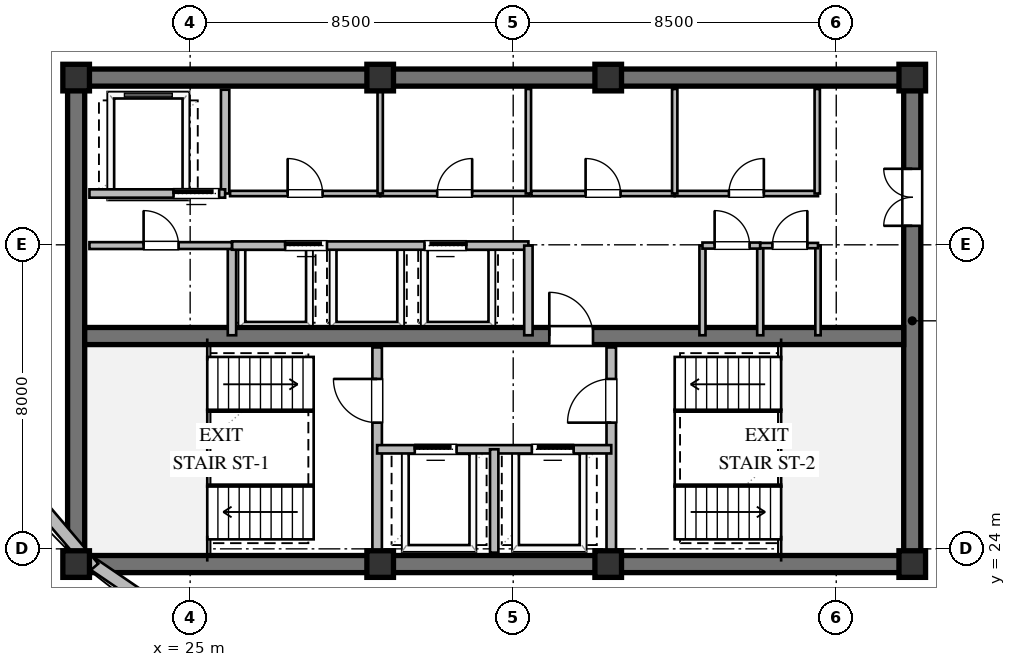
"""IFC4 building model, lengths in metres.
Left out: names, types, materials, properties, quantities, classifications, styles, units other than length and angle.
Written with IfcOpenShell. Run it as: python <this file> out.ifc"""

import sys

from ifc_helpers import new_model, si_unit, direction, frame, frame_2d, origin, origin_2d, place, context, subcontext, project, spatial, rectangle, extrude, element, fill, save


model = new_model("IFC4")
c1 = context("Model", 3, precision=1e-05, world=origin(), true_north=direction((0.0, 1.0)))
c2 = subcontext(c1, "Body", "Model", "MODEL_VIEW")
j1 = project(units=[si_unit("LENGTHUNIT", "METRE"), si_unit("PLANEANGLEUNIT", "RADIAN")], contexts=[c1])
p1 = place(None, origin())
s1 = spatial("IfcSite", under=j1, at=p1, CompositionType="ELEMENT")
p2 = place(p1, origin())
s2 = spatial("IfcBuilding", under=s1, at=p2, CompositionType="ELEMENT")
p3 = place(p2, frame((0.0, 0.0, 277.6)))
s3 = spatial("IfcBuildingStorey", under=s2, at=p3, CompositionType="ELEMENT", Elevation=277.6)
for number, where, z_axis, x_axis in (
    (1, (21.775, 23.6, 0.0), (0.0, 0.0, 1.0), (1.0, 0.0, 0.0)),
    (2, (21.775, 36.4, 0.0), (0.0, 0.0, 1.0), (1.0, 0.0, 0.0)),
):
    element("IfcWall", number, at=place(p3, frame(where, z_axis=z_axis, x_axis=x_axis)), inside=s3, PredefinedType="SHEAR", context=c2, shape_type="SweptSolid", body=[
        extrude(rectangle(XDim=22.45, YDim=0.45, at=frame_2d((11.225, 0.0))), origin(), (0.0, 0.0, 1.0), 3.48),
    ])
p4 = place(p3, frame((22.0, 23.825, 0.0), z_axis=(0.0, 0.0, 1.0), x_axis=(0.0, 1.0, 0.0)))
e3 = element("IfcWall", 3, at=p4, inside=s3, PredefinedType="SHEAR", context=c2, shape_type="SweptSolid", body=[
    extrude(rectangle(XDim=12.35, YDim=0.45, at=frame_2d((6.175, 0.0))), origin(), (0.0, 0.0, 1.0), 3.48),
])
p5 = place(p3, frame((44.0, 23.825, 0.0), z_axis=(0.0, 0.0, 1.0), x_axis=(0.0, 1.0, 0.0)))
e4 = element("IfcWall", 4, at=p5, inside=s3, PredefinedType="SHEAR", context=c2, shape_type="SweptSolid", body=[
    extrude(rectangle(XDim=12.35, YDim=0.45, at=frame_2d((6.175, 0.0))), origin(), (0.0, 0.0, 1.0), 3.48),
])
p6 = place(p5, frame((8.675, 0.0, 0.0)))
e5 = element("IfcOpeningElement", 5, at=p6, cuts=e4, PredefinedType="OPENING", context=c2, shape_type="SweptSolid", body=[
    extrude(rectangle(XDim=1.5, YDim=2.15, at=frame_2d((0.75, 1.075))), frame((0.0, 0.235, 0.0), z_axis=(0.0, -1.0, 0.0), x_axis=(1.0, 0.0, 0.0)), (0.0, 0.0, 1.0), 0.47),
])
p7 = place(p3, frame((22.225, 29.6, 0.0), z_axis=(0.0, 0.0, 1.0), x_axis=(1.0, 0.0, 0.0)))
e6 = element("IfcWall", 6, at=p7, inside=s3, PredefinedType="SHEAR", context=c2, shape_type="SweptSolid", body=[
    extrude(rectangle(XDim=21.55, YDim=0.45, at=frame_2d((10.775, 0.0))), origin(), (0.0, 0.0, 1.0), 3.48),
])
p8 = place(p7, frame((12.225, 0.0, 0.0)))
e7 = element("IfcOpeningElement", 7, at=p8, cuts=e6, PredefinedType="OPENING", context=c2, shape_type="SweptSolid", body=[
    extrude(rectangle(XDim=1.15, YDim=2.1, at=frame_2d((0.575, 1.05))), frame((0.0, 0.235, 0.0), z_axis=(0.0, -1.0, 0.0), x_axis=(1.0, 0.0, 0.0)), (0.0, 0.0, 1.0), 0.47),
])
for number, where, z_axis, x_axis in (
    (8, (22.0, 23.6, 0.0), (0.0, 0.0, 1.0), (1.0, 0.0, 0.0)),
    (9, (30.0, 23.6, 0.0), (0.0, 0.0, 1.0), (1.0, 0.0, 0.0)),
    (10, (36.0, 23.6, 0.0), (0.0, 0.0, 1.0), (1.0, 0.0, 0.0)),
    (11, (44.0, 23.6, 0.0), (0.0, 0.0, 1.0), (1.0, 0.0, 0.0)),
    (12, (44.0, 36.4, 0.0), (0.0, 0.0, 1.0), (1.0, 0.0, 0.0)),
    (13, (36.0, 36.4, 0.0), (0.0, 0.0, 1.0), (1.0, 0.0, 0.0)),
    (14, (30.0, 36.4, 0.0), (0.0, 0.0, 1.0), (1.0, 0.0, 0.0)),
    (15, (22.0, 36.4, 0.0), (0.0, 0.0, 1.0), (1.0, 0.0, 0.0)),
):
    element("IfcColumn", number, at=place(p3, frame(where, z_axis=z_axis, x_axis=x_axis)), inside=s3, PredefinedType="COLUMN", context=c2, shape_type="SweptSolid", body=[
        extrude(rectangle(XDim=0.7, YDim=0.7, at=origin_2d()), origin(), (0.0, 0.0, 1.0), 3.8),
    ])
p9 = place(p3, frame((27.093, 20.428, 0.0), z_axis=(0.0, 0.0, 1.0), x_axis=(-0.826047009588, 0.563601222454, 0.0)))
e16 = element("IfcWall", 16, at=p9, inside=s3, PredefinedType="STANDARD", context=c2, shape_type="SweptSolid", body=[
    extrude(rectangle(XDim=6.074, YDim=0.32, at=frame_2d((3.037, 0.0))), origin(), (0.0, 0.0, 1.0), 2.35),
])
p10 = place(p3, frame((22.46, 23.506, 0.0), z_axis=(0.0, 0.0, 1.0), x_axis=(-0.648393724369, 0.761305180725, 0.0)))
e17 = element("IfcWall", 17, at=p10, inside=s3, PredefinedType="STANDARD", context=c2, shape_type="SweptSolid", body=[
    extrude(rectangle(XDim=5.836, YDim=0.32, at=frame_2d((2.918, 0.0))), origin(), (0.0, 0.0, 1.0), 2.62),
])
p11 = place(p3, frame((29.92, 23.9, 0.0), z_axis=(0.0, 0.0, 1.0), x_axis=(0.0, 1.0, 0.0)))
e18 = element("IfcWall", 18, at=p11, inside=s3, PredefinedType="SOLIDWALL", context=c2, shape_type="SweptSolid", body=[
    extrude(rectangle(XDim=5.4, YDim=0.25, at=frame_2d((2.7, 0.0))), origin(), (0.0, 0.0, 1.0), 3.01),
])
p12 = place(p11, frame((3.421, 0.0, 0.0)))
e19 = element("IfcOpeningElement", 19, at=p12, cuts=e18, PredefinedType="OPENING", context=c2, shape_type="SweptSolid", body=[
    extrude(rectangle(XDim=1.15, YDim=2.1, at=frame_2d((0.575, 1.05))), frame((0.0, 0.135, 0.0), z_axis=(0.0, -1.0, 0.0), x_axis=(1.0, 0.0, 0.0)), (0.0, 0.0, 1.0), 0.27),
])
p13 = place(p3, frame((36.08, 23.9, 0.0), z_axis=(0.0, 0.0, 1.0), x_axis=(0.0, 1.0, 0.0)))
e20 = element("IfcWall", 20, at=p13, inside=s3, PredefinedType="SOLIDWALL", context=c2, shape_type="SweptSolid", body=[
    extrude(rectangle(XDim=5.4, YDim=0.25, at=frame_2d((2.7, 0.0))), origin(), (0.0, 0.0, 1.0), 3.48),
])
p14 = place(p13, frame((3.421, 0.0, 0.0)))
e21 = element("IfcOpeningElement", 21, at=p14, cuts=e20, PredefinedType="OPENING", context=c2, shape_type="SweptSolid", body=[
    extrude(rectangle(XDim=1.15, YDim=2.1, at=frame_2d((0.575, 1.05))), frame((0.0, 0.135, 0.0), z_axis=(0.0, -1.0, 0.0), x_axis=(1.0, 0.0, 0.0)), (0.0, 0.0, 1.0), 0.27),
])
p15 = place(p3, frame((29.92, 26.62, 0.0), z_axis=(0.0, 0.0, 1.0), x_axis=(1.0, 0.0, 0.0)))
e22 = element("IfcWall", 22, at=p15, inside=s3, PredefinedType="SOLIDWALL", context=c2, shape_type="SweptSolid", body=[
    extrude(rectangle(XDim=6.16, YDim=0.22, at=frame_2d((3.08, 0.0))), origin(), (0.0, 0.0, 1.0), 3.48),
])
p16 = place(p15, frame((0.99, 0.0, 0.0)))
e23 = element("IfcOpeningElement", 23, at=p16, cuts=e22, PredefinedType="OPENING", context=c2, shape_type="SweptSolid", body=[
    extrude(rectangle(XDim=1.1, YDim=2.1, at=frame_2d((0.55, 1.05))), frame((0.0, 0.12, 0.0), z_axis=(0.0, -1.0, 0.0), x_axis=(1.0, 0.0, 0.0)), (0.0, 0.0, 1.0), 0.24),
])
p17 = place(p15, frame((4.07, 0.0, 0.0)))
e24 = element("IfcOpeningElement", 24, at=p17, cuts=e22, PredefinedType="OPENING", context=c2, shape_type="SweptSolid", body=[
    extrude(rectangle(XDim=1.1, YDim=2.1, at=frame_2d((0.55, 1.05))), frame((0.0, 0.12, 0.0), z_axis=(0.0, -1.0, 0.0), x_axis=(1.0, 0.0, 0.0)), (0.0, 0.0, 1.0), 0.24),
])
p18 = place(p3, frame((33.0, 23.9, 0.0), z_axis=(0.0, 0.0, 1.0), x_axis=(0.0, 1.0, 0.0)))
e25 = element("IfcWall", 25, at=p18, inside=s3, PredefinedType="SOLIDWALL", context=c2, shape_type="SweptSolid", body=[
    extrude(rectangle(XDim=2.72, YDim=0.22, at=frame_2d((1.36, 0.0))), origin(), (0.0, 0.0, 1.0), 3.48),
])
p19 = place(p3, frame((25.92, 33.35, 0.0), z_axis=(0.0, 0.0, 1.0), x_axis=(0.0, 1.0, 0.0)))
e26 = element("IfcWall", 26, at=p19, inside=s3, PredefinedType="SOLIDWALL", context=c2, shape_type="SweptSolid", body=[
    extrude(rectangle(XDim=2.73, YDim=0.22, at=frame_2d((1.365, 0.0))), origin(), (0.0, 0.0, 1.0), 3.48),
])
p20 = place(p3, frame((22.35, 33.35, 0.0), z_axis=(0.0, 0.0, 1.0), x_axis=(1.0, 0.0, 0.0)))
e27 = element("IfcWall", 27, at=p20, inside=s3, PredefinedType="SOLIDWALL", context=c2, shape_type="SweptSolid", body=[
    extrude(rectangle(XDim=3.57, YDim=0.22, at=frame_2d((1.785, 0.0))), origin(), (0.0, 0.0, 1.0), 3.48),
])
p21 = place(p20, frame((2.213, 0.0, 0.0)))
e28 = element("IfcOpeningElement", 28, at=p21, cuts=e27, PredefinedType="OPENING", context=c2, shape_type="SweptSolid", body=[
    extrude(rectangle(XDim=1.2, YDim=2.1, at=frame_2d((0.6, 1.05))), frame((0.0, 0.12, 0.0), z_axis=(0.0, -1.0, 0.0), x_axis=(1.0, 0.0, 0.0)), (0.0, 0.0, 1.0), 0.24),
])
p22 = place(p3, frame((26.1, 29.62, 0.0), z_axis=(0.0, 0.0, 1.0), x_axis=(0.0, 1.0, 0.0)))
e29 = element("IfcWall", 29, at=p22, inside=s3, PredefinedType="SOLIDWALL", context=c2, shape_type="SweptSolid", body=[
    extrude(rectangle(XDim=2.36, YDim=0.22, at=frame_2d((1.18, 0.0))), origin(), (0.0, 0.0, 1.0), 3.48),
])
p23 = place(p3, frame((26.1, 31.98, 0.0), z_axis=(0.0, 0.0, 1.0), x_axis=(1.0, 0.0, 0.0)))
e30 = element("IfcWall", 30, at=p23, inside=s3, PredefinedType="SOLIDWALL", context=c2, shape_type="SweptSolid", body=[
    extrude(rectangle(XDim=7.8, YDim=0.22, at=frame_2d((3.9, 0.0))), origin(), (0.0, 0.0, 1.0), 3.48),
])
p24 = place(p23, frame((1.4, 0.0, 0.0)))
e31 = element("IfcOpeningElement", 31, at=p24, cuts=e30, PredefinedType="OPENING", context=c2, shape_type="SweptSolid", body=[
    extrude(rectangle(XDim=1.1, YDim=2.1, at=frame_2d((0.55, 1.05))), frame((0.0, 0.12, 0.0), z_axis=(0.0, -1.0, 0.0), x_axis=(1.0, 0.0, 0.0)), (0.0, 0.0, 1.0), 0.24),
])
p25 = place(p23, frame((5.066, 0.0, 0.0)))
e32 = element("IfcOpeningElement", 32, at=p25, cuts=e30, PredefinedType="OPENING", context=c2, shape_type="SweptSolid", body=[
    extrude(rectangle(XDim=1.1, YDim=2.1, at=frame_2d((0.55, 1.05))), frame((0.0, 0.12, 0.0), z_axis=(0.0, -1.0, 0.0), x_axis=(1.0, 0.0, 0.0)), (0.0, 0.0, 1.0), 0.24),
])
p26 = place(p3, frame((33.9, 29.62, 0.0), z_axis=(0.0, 0.0, 1.0), x_axis=(0.0, 1.0, 0.0)))
e33 = element("IfcWall", 33, at=p26, inside=s3, PredefinedType="SOLIDWALL", context=c2, shape_type="SweptSolid", body=[
    extrude(rectangle(XDim=2.36, YDim=0.22, at=frame_2d((1.18, 0.0))), origin(), (0.0, 0.0, 1.0), 3.48),
])
p27 = place(p3, frame((26.05, 33.35, 0.0), z_axis=(0.0, 0.0, 1.0), x_axis=(1.0, 0.0, 0.0)))
e34 = element("IfcWall", 34, at=p27, inside=s3, PredefinedType="PARTITIONING", context=c2, shape_type="SweptSolid", body=[
    extrude(rectangle(XDim=3.95, YDim=0.14, at=frame_2d((1.975, 0.0))), origin(), (0.0, 0.0, 1.0), 3.48),
])
p28 = place(p27, frame((1.515, 0.0, 0.0)))
e35 = element("IfcOpeningElement", 35, at=p28, cuts=e34, PredefinedType="OPENING", context=c2, shape_type="SweptSolid", body=[
    extrude(rectangle(XDim=0.92, YDim=2.1, at=frame_2d((0.46, 1.05))), frame((0.0, 0.08, 0.0), z_axis=(0.0, -1.0, 0.0), x_axis=(1.0, 0.0, 0.0)), (0.0, 0.0, 1.0), 0.16),
])
p29 = place(p3, frame((30.0, 33.35, 0.0), z_axis=(0.0, 0.0, 1.0), x_axis=(1.0, 0.0, 0.0)))
e36 = element("IfcWall", 36, at=p29, inside=s3, PredefinedType="PARTITIONING", context=c2, shape_type="SweptSolid", body=[
    extrude(rectangle(XDim=3.92, YDim=0.14, at=frame_2d((1.96, 0.0))), origin(), (0.0, 0.0, 1.0), 3.48),
])
p30 = place(p29, frame((1.5, 0.0, 0.0)))
e37 = element("IfcOpeningElement", 37, at=p30, cuts=e36, PredefinedType="OPENING", context=c2, shape_type="SweptSolid", body=[
    extrude(rectangle(XDim=0.92, YDim=2.1, at=frame_2d((0.46, 1.05))), frame((0.0, 0.08, 0.0), z_axis=(0.0, -1.0, 0.0), x_axis=(1.0, 0.0, 0.0)), (0.0, 0.0, 1.0), 0.16),
])
for number, where, z_axis, x_axis in (
    (38, (30.0, 33.35, 0.0), (0.0, 0.0, 1.0), (0.0, 1.0, 0.0)),
    (39, (33.9, 33.35, 0.0), (0.0, 0.0, 1.0), (0.0, 1.0, 0.0)),
):
    element("IfcWall", number, at=place(p3, frame(where, z_axis=z_axis, x_axis=x_axis)), inside=s3, PredefinedType="PARTITIONING", context=c2, shape_type="SweptSolid", body=[
        extrude(rectangle(XDim=2.75, YDim=0.14, at=frame_2d((1.375, 0.0))), origin(), (0.0, 0.0, 1.0), 3.48),
    ])
p31 = place(p3, frame((33.98, 33.35, 0.0), z_axis=(0.0, 0.0, 1.0), x_axis=(1.0, 0.0, 0.0)))
e40 = element("IfcWall", 40, at=p31, inside=s3, PredefinedType="PARTITIONING", context=c2, shape_type="SweptSolid", body=[
    extrude(rectangle(XDim=3.77, YDim=0.14, at=frame_2d((1.885, 0.0))), origin(), (0.0, 0.0, 1.0), 3.48),
])
p32 = place(p31, frame((1.425, 0.0, 0.0)))
e41 = element("IfcOpeningElement", 41, at=p32, cuts=e40, PredefinedType="OPENING", context=c2, shape_type="SweptSolid", body=[
    extrude(rectangle(XDim=0.92, YDim=2.1, at=frame_2d((0.46, 1.05))), frame((0.0, 0.08, 0.0), z_axis=(0.0, -1.0, 0.0), x_axis=(1.0, 0.0, 0.0)), (0.0, 0.0, 1.0), 0.16),
])
p33 = place(p3, frame((37.75, 33.35, 0.0), z_axis=(0.0, 0.0, 1.0), x_axis=(1.0, 0.0, 0.0)))
e42 = element("IfcWall", 42, at=p33, inside=s3, PredefinedType="PARTITIONING", context=c2, shape_type="SweptSolid", body=[
    extrude(rectangle(XDim=3.77, YDim=0.14, at=frame_2d((1.885, 0.0))), origin(), (0.0, 0.0, 1.0), 3.48),
])
p34 = place(p33, frame((1.425, 0.0, 0.0)))
e43 = element("IfcOpeningElement", 43, at=p34, cuts=e42, PredefinedType="OPENING", context=c2, shape_type="SweptSolid", body=[
    extrude(rectangle(XDim=0.92, YDim=2.1, at=frame_2d((0.46, 1.05))), frame((0.0, 0.08, 0.0), z_axis=(0.0, -1.0, 0.0), x_axis=(1.0, 0.0, 0.0)), (0.0, 0.0, 1.0), 0.16),
])
for number, where, z_axis, x_axis in (
    (44, (37.75, 33.35, 0.0), (0.0, 0.0, 1.0), (0.0, 1.0, 0.0)),
    (45, (41.5, 33.35, 0.0), (0.0, 0.0, 1.0), (0.0, 1.0, 0.0)),
):
    element("IfcWall", number, at=place(p3, frame(where, z_axis=z_axis, x_axis=x_axis)), inside=s3, PredefinedType="PARTITIONING", context=c2, shape_type="SweptSolid", body=[
        extrude(rectangle(XDim=2.75, YDim=0.14, at=frame_2d((1.375, 0.0))), origin(), (0.0, 0.0, 1.0), 3.48),
    ])
p35 = place(p3, frame((22.35, 31.98, 0.0), z_axis=(0.0, 0.0, 1.0), x_axis=(1.0, 0.0, 0.0)))
e46 = element("IfcWall", 46, at=p35, inside=s3, PredefinedType="PARTITIONING", context=c2, shape_type="SweptSolid", body=[
    extrude(rectangle(XDim=3.75, YDim=0.18, at=frame_2d((1.875, 0.0))), origin(), (0.0, 0.0, 1.0), 3.48),
])
p36 = place(p35, frame((1.425, 0.0, 0.0)))
e47 = element("IfcOpeningElement", 47, at=p36, cuts=e46, PredefinedType="OPENING", context=c2, shape_type="SweptSolid", body=[
    extrude(rectangle(XDim=0.92, YDim=2.1, at=frame_2d((0.46, 1.05))), frame((0.0, 0.1, 0.0), z_axis=(0.0, -1.0, 0.0), x_axis=(1.0, 0.0, 0.0)), (0.0, 0.0, 1.0), 0.2),
])
for number, where, z_axis, x_axis in (
    (48, (38.48, 29.62, 0.0), (0.0, 0.0, 1.0), (0.0, 1.0, 0.0)),
    (49, (40.0, 29.62, 0.0), (0.0, 0.0, 1.0), (0.0, 1.0, 0.0)),
):
    element("IfcWall", number, at=place(p3, frame(where, z_axis=z_axis, x_axis=x_axis)), inside=s3, PredefinedType="PLUMBINGWALL", context=c2, shape_type="SweptSolid", body=[
        extrude(rectangle(XDim=2.36, YDim=0.16, at=frame_2d((1.18, 0.0))), origin(), (0.0, 0.0, 1.0), 3.48),
    ])
p37 = place(p3, frame((41.52, 29.62, 0.0), z_axis=(0.0, 0.0, 1.0), x_axis=(0.0, 1.0, 0.0)))
e50 = element("IfcWall", 50, at=p37, inside=s3, PredefinedType="PARTITIONING", context=c2, shape_type="SweptSolid", body=[
    extrude(rectangle(XDim=2.36, YDim=0.14, at=frame_2d((1.18, 0.0))), origin(), (0.0, 0.0, 1.0), 3.48),
])
p38 = place(p3, frame((38.48, 31.98, 0.0), z_axis=(0.0, 0.0, 1.0), x_axis=(1.0, 0.0, 0.0)))
e51 = element("IfcWall", 51, at=p38, inside=s3, PredefinedType="PLUMBINGWALL", context=c2, shape_type="SweptSolid", body=[
    extrude(rectangle(XDim=1.52, YDim=0.16, at=frame_2d((0.76, 0.0))), origin(), (0.0, 0.0, 1.0), 3.48),
])
p39 = place(p38, frame((0.32, 0.0, 0.0)))
e52 = element("IfcOpeningElement", 52, at=p39, cuts=e51, PredefinedType="OPENING", context=c2, shape_type="SweptSolid", body=[
    extrude(rectangle(XDim=0.92, YDim=2.1, at=frame_2d((0.46, 1.05))), frame((0.0, 0.09, 0.0), z_axis=(0.0, -1.0, 0.0), x_axis=(1.0, 0.0, 0.0)), (0.0, 0.0, 1.0), 0.18),
])
p40 = place(p3, frame((40.0, 31.98, 0.0), z_axis=(0.0, 0.0, 1.0), x_axis=(1.0, 0.0, 0.0)))
e53 = element("IfcWall", 53, at=p40, inside=s3, PredefinedType="PARTITIONING", context=c2, shape_type="SweptSolid", body=[
    extrude(rectangle(XDim=1.52, YDim=0.14, at=frame_2d((0.76, 0.0))), origin(), (0.0, 0.0, 1.0), 3.48),
])
p41 = place(p40, frame((0.32, 0.0, 0.0)))
e54 = element("IfcOpeningElement", 54, at=p41, cuts=e53, PredefinedType="OPENING", context=c2, shape_type="SweptSolid", body=[
    extrude(rectangle(XDim=0.92, YDim=2.1, at=frame_2d((0.46, 1.05))), frame((0.0, 0.08, 0.0), z_axis=(0.0, -1.0, 0.0), x_axis=(1.0, 0.0, 0.0)), (0.0, 0.0, 1.0), 0.16),
])
p42 = place(p12, origin())
e55 = element("IfcDoor", 55, at=p42, inside=s3, OperationType="SINGLE_SWING_RIGHT", PredefinedType="DOOR", context=c2, shape_type="SweptSolid", body=[
    extrude(rectangle(XDim=1.15, YDim=2.1, at=frame_2d((0.575, 1.05))), frame((0.0, 0.025, 0.0), z_axis=(0.0, -1.0, 0.0), x_axis=(1.0, 0.0, 0.0)), (0.0, 0.0, 1.0), 0.05),
])
fill(e19, e55)
p43 = place(p14, origin())
e56 = element("IfcDoor", 56, at=p43, inside=s3, OperationType="SINGLE_SWING_LEFT", PredefinedType="DOOR", context=c2, shape_type="SweptSolid", body=[
    extrude(rectangle(XDim=1.15, YDim=2.1, at=frame_2d((0.575, 1.05))), frame((0.0, 0.025, 0.0), z_axis=(0.0, -1.0, 0.0), x_axis=(1.0, 0.0, 0.0)), (0.0, 0.0, 1.0), 0.05),
])
fill(e21, e56)
p44 = place(p16, origin())
e57 = element("IfcDoor", 57, at=p44, inside=s3, OperationType="SLIDING_TO_LEFT", PredefinedType="DOOR", context=c2, shape_type="SweptSolid", body=[
    extrude(rectangle(XDim=1.1, YDim=2.1, at=frame_2d((0.55, 1.05))), frame((0.0, 0.025, 0.0), z_axis=(0.0, -1.0, 0.0), x_axis=(1.0, 0.0, 0.0)), (0.0, 0.0, 1.0), 0.05),
])
fill(e23, e57)
p45 = place(p17, origin())
e58 = element("IfcDoor", 58, at=p45, inside=s3, OperationType="SLIDING_TO_RIGHT", PredefinedType="DOOR", context=c2, shape_type="SweptSolid", body=[
    extrude(rectangle(XDim=1.1, YDim=2.1, at=frame_2d((0.55, 1.05))), frame((0.0, 0.025, 0.0), z_axis=(0.0, -1.0, 0.0), x_axis=(1.0, 0.0, 0.0)), (0.0, 0.0, 1.0), 0.05),
])
fill(e24, e58)
p46 = place(p8, origin())
e59 = element("IfcDoor", 59, at=p46, inside=s3, OperationType="SINGLE_SWING_LEFT", PredefinedType="DOOR", context=c2, shape_type="SweptSolid", body=[
    extrude(rectangle(XDim=1.15, YDim=2.1, at=frame_2d((0.575, 1.05))), frame((0.0, 0.025, 0.0), z_axis=(0.0, -1.0, 0.0), x_axis=(1.0, 0.0, 0.0)), (0.0, 0.0, 1.0), 0.05),
])
fill(e7, e59)
p47 = place(p6, origin())
e60 = element("IfcDoor", 60, at=p47, inside=s3, OperationType="DOUBLE_DOOR_SINGLE_SWING", PredefinedType="DOOR", context=c2, shape_type="SweptSolid", body=[
    extrude(rectangle(XDim=1.5, YDim=2.15, at=frame_2d((0.75, 1.075))), frame((0.0, 0.025, 0.0), z_axis=(0.0, -1.0, 0.0), x_axis=(1.0, 0.0, 0.0)), (0.0, 0.0, 1.0), 0.05),
])
fill(e5, e60)
p48 = place(p21, origin())
e61 = element("IfcDoor", 61, at=p48, inside=s3, OperationType="SLIDING_TO_LEFT", PredefinedType="DOOR", context=c2, shape_type="SweptSolid", body=[
    extrude(rectangle(XDim=1.2, YDim=2.1, at=frame_2d((0.6, 1.05))), frame((0.0, 0.025, 0.0), z_axis=(0.0, -1.0, 0.0), x_axis=(1.0, 0.0, 0.0)), (0.0, 0.0, 1.0), 0.05),
])
fill(e28, e61)
p49 = place(p24, origin())
e62 = element("IfcDoor", 62, at=p49, inside=s3, OperationType="SLIDING_TO_LEFT", PredefinedType="DOOR", context=c2, shape_type="SweptSolid", body=[
    extrude(rectangle(XDim=1.1, YDim=2.1, at=frame_2d((0.55, 1.05))), frame((0.0, 0.025, 0.0), z_axis=(0.0, -1.0, 0.0), x_axis=(1.0, 0.0, 0.0)), (0.0, 0.0, 1.0), 0.05),
])
fill(e31, e62)
p50 = place(p25, origin())
e63 = element("IfcDoor", 63, at=p50, inside=s3, OperationType="SLIDING_TO_RIGHT", PredefinedType="DOOR", context=c2, shape_type="SweptSolid", body=[
    extrude(rectangle(XDim=1.1, YDim=2.1, at=frame_2d((0.55, 1.05))), frame((0.0, 0.025, 0.0), z_axis=(0.0, -1.0, 0.0), x_axis=(1.0, 0.0, 0.0)), (0.0, 0.0, 1.0), 0.05),
])
fill(e32, e63)
p51 = place(p28, origin())
e64 = element("IfcDoor", 64, at=p51, inside=s3, OperationType="SINGLE_SWING_LEFT", PredefinedType="DOOR", context=c2, shape_type="SweptSolid", body=[
    extrude(rectangle(XDim=0.92, YDim=2.1, at=frame_2d((0.46, 1.05))), frame((0.0, 0.025, 0.0), z_axis=(0.0, -1.0, 0.0), x_axis=(1.0, 0.0, 0.0)), (0.0, 0.0, 1.0), 0.05),
])
fill(e35, e64)
p52 = place(p30, origin())
e65 = element("IfcDoor", 65, at=p52, inside=s3, OperationType="SINGLE_SWING_RIGHT", PredefinedType="DOOR", context=c2, shape_type="SweptSolid", body=[
    extrude(rectangle(XDim=0.92, YDim=2.1, at=frame_2d((0.46, 1.05))), frame((0.0, 0.025, 0.0), z_axis=(0.0, -1.0, 0.0), x_axis=(1.0, 0.0, 0.0)), (0.0, 0.0, 1.0), 0.05),
])
fill(e37, e65)
p53 = place(p32, origin())
e66 = element("IfcDoor", 66, at=p53, inside=s3, OperationType="SINGLE_SWING_LEFT", PredefinedType="DOOR", context=c2, shape_type="SweptSolid", body=[
    extrude(rectangle(XDim=0.92, YDim=2.1, at=frame_2d((0.46, 1.05))), frame((0.0, 0.025, 0.0), z_axis=(0.0, -1.0, 0.0), x_axis=(1.0, 0.0, 0.0)), (0.0, 0.0, 1.0), 0.05),
])
fill(e41, e66)
p54 = place(p34, origin())
e67 = element("IfcDoor", 67, at=p54, inside=s3, OperationType="SINGLE_SWING_RIGHT", PredefinedType="DOOR", context=c2, shape_type="SweptSolid", body=[
    extrude(rectangle(XDim=0.92, YDim=2.1, at=frame_2d((0.46, 1.05))), frame((0.0, 0.025, 0.0), z_axis=(0.0, -1.0, 0.0), x_axis=(1.0, 0.0, 0.0)), (0.0, 0.0, 1.0), 0.05),
])
fill(e43, e67)
p55 = place(p36, origin())
e68 = element("IfcDoor", 68, at=p55, inside=s3, OperationType="SINGLE_SWING_LEFT", PredefinedType="DOOR", context=c2, shape_type="SweptSolid", body=[
    extrude(rectangle(XDim=0.92, YDim=2.1, at=frame_2d((0.46, 1.05))), frame((0.0, 0.025, 0.0), z_axis=(0.0, -1.0, 0.0), x_axis=(1.0, 0.0, 0.0)), (0.0, 0.0, 1.0), 0.05),
])
fill(e47, e68)
p56 = place(p39, origin())
e69 = element("IfcDoor", 69, at=p56, inside=s3, OperationType="SINGLE_SWING_LEFT", PredefinedType="DOOR", context=c2, shape_type="SweptSolid", body=[
    extrude(rectangle(XDim=0.92, YDim=2.1, at=frame_2d((0.46, 1.05))), frame((0.0, 0.025, 0.0), z_axis=(0.0, -1.0, 0.0), x_axis=(1.0, 0.0, 0.0)), (0.0, 0.0, 1.0), 0.05),
])
fill(e52, e69)
p57 = place(p41, origin())
e70 = element("IfcDoor", 70, at=p57, inside=s3, OperationType="SINGLE_SWING_RIGHT", PredefinedType="DOOR", context=c2, shape_type="SweptSolid", body=[
    extrude(rectangle(XDim=0.92, YDim=2.1, at=frame_2d((0.46, 1.05))), frame((0.0, 0.025, 0.0), z_axis=(0.0, -1.0, 0.0), x_axis=(1.0, 0.0, 0.0)), (0.0, 0.0, 1.0), 0.05),
])
fill(e54, e70)
save(model, sys.argv[1])
